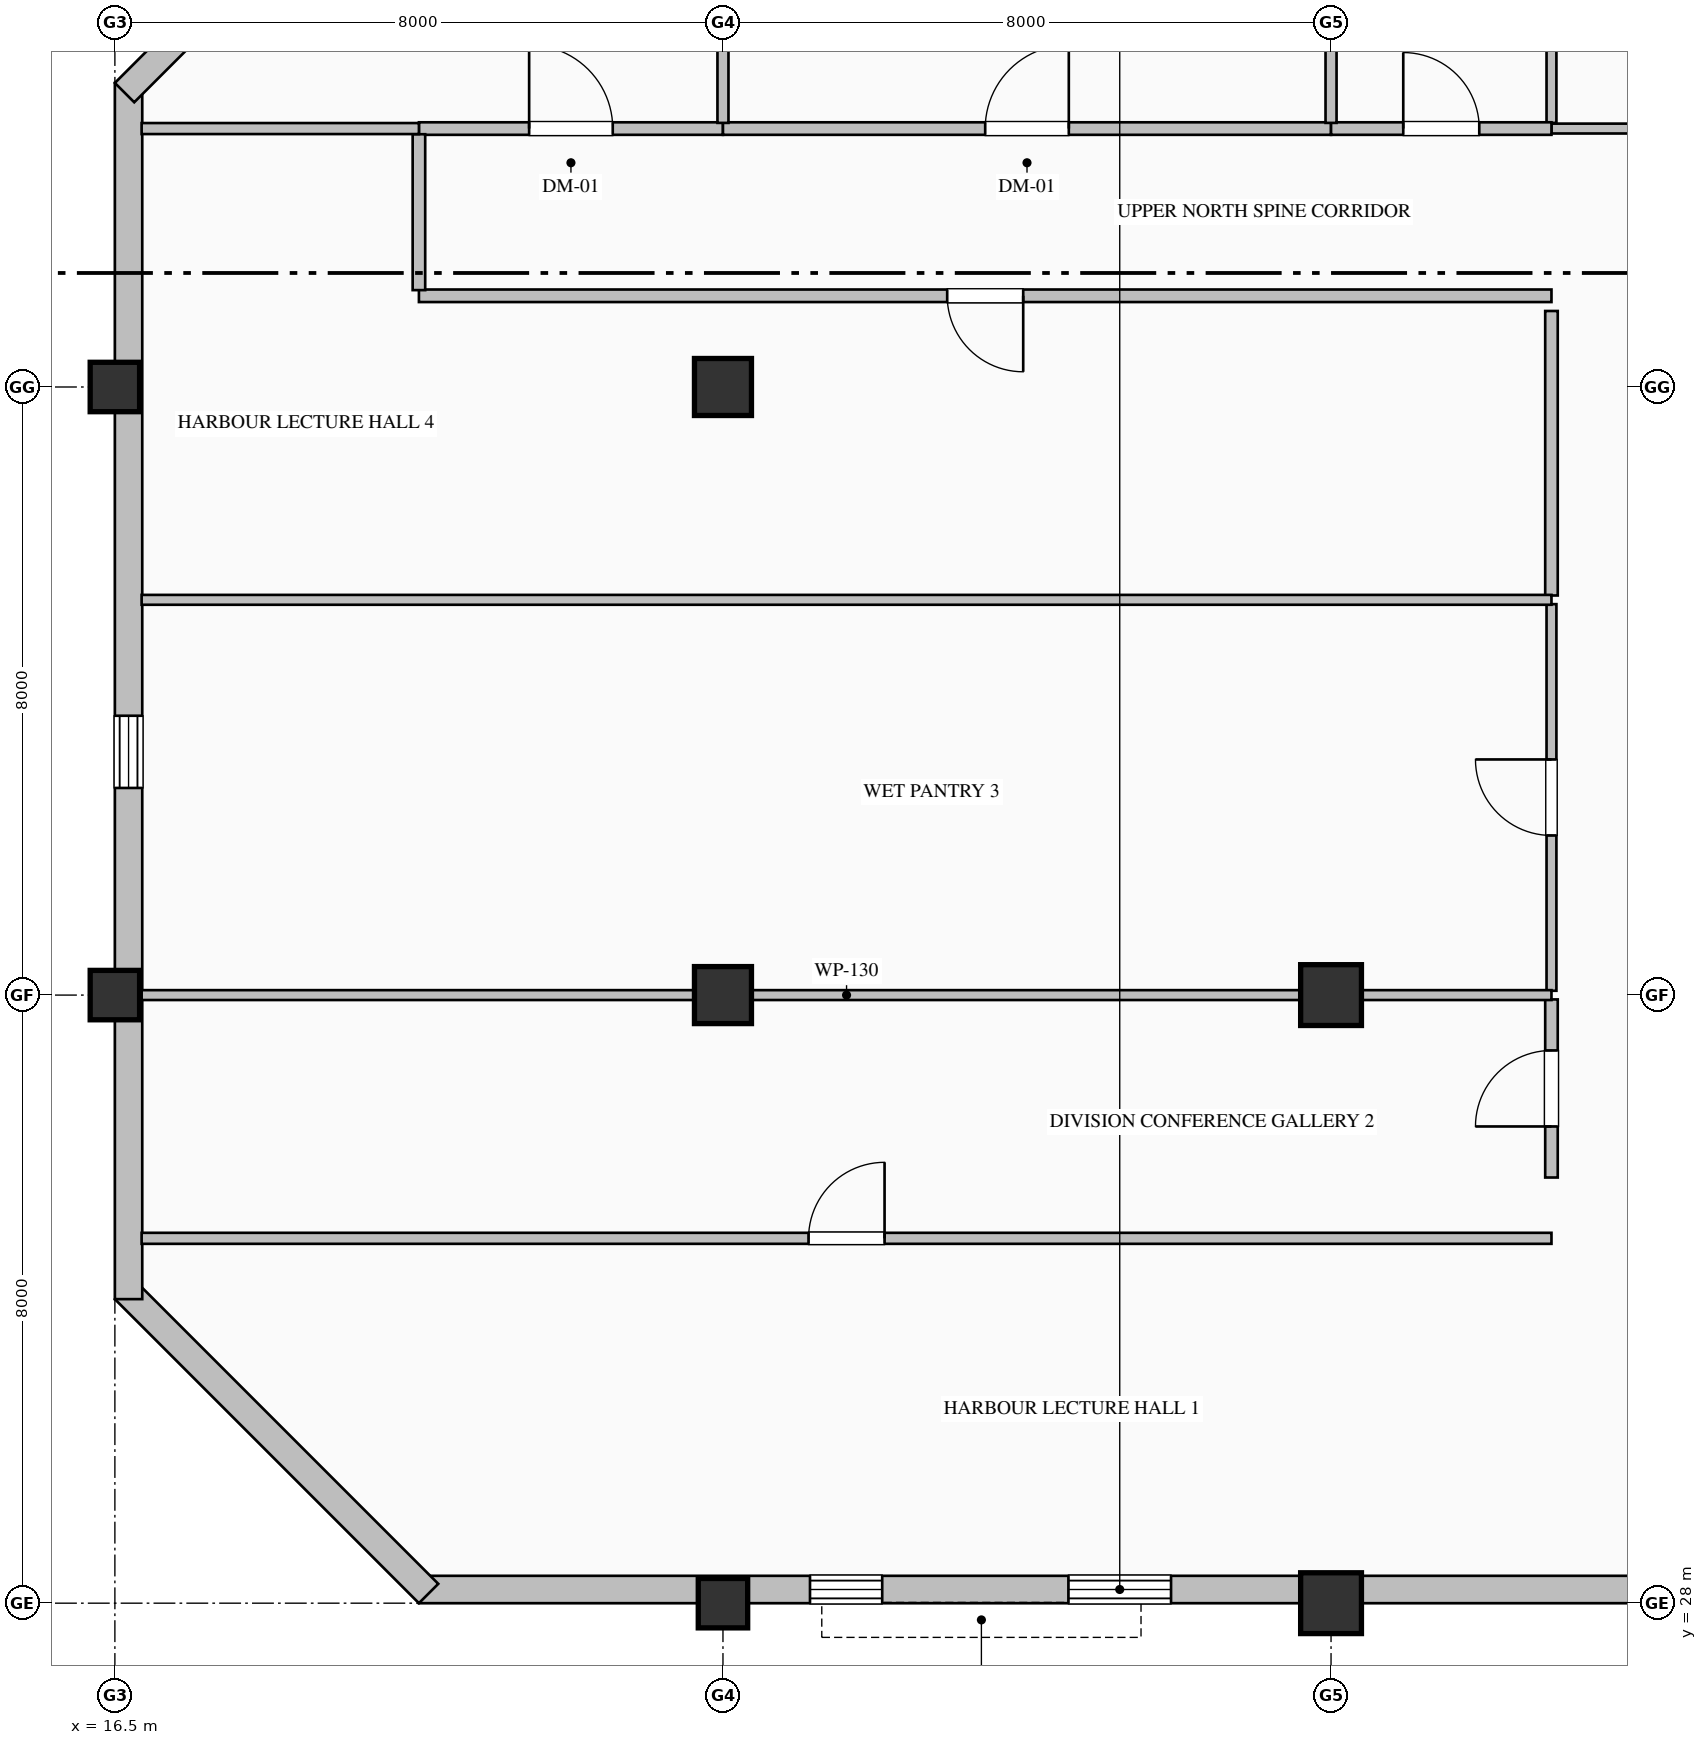
"""IFC4 building model, lengths in metres.
Left out: names, types, materials, properties, quantities, classifications, styles, units other than length and angle.
Written with IfcOpenShell. Run it as: python <this file> out.ifc"""

import sys

from ifc_helpers import new_model, si_unit, direction, frame, frame_2d, origin, origin_2d, place, context, subcontext, project, spatial, rectangle, hollow_rectangle, extrude, element, fill, save


model = new_model("IFC4")
c1 = context("Model", 3, precision=1e-05, world=origin(), true_north=direction((0.0, 1.0)))
c2 = subcontext(c1, "Body", "Model", "MODEL_VIEW")
j1 = project(units=[si_unit("LENGTHUNIT", "METRE"), si_unit("PLANEANGLEUNIT", "RADIAN")], contexts=[c1])
p1 = place(None, origin())
s1 = spatial("IfcSite", under=j1, at=p1, CompositionType="ELEMENT")
p2 = place(p1, origin())
s2 = spatial("IfcBuilding", under=s1, at=p2, CompositionType="ELEMENT")
p3 = place(p2, frame((0.0, 0.0, 307.2)))
s3 = spatial("IfcBuildingStorey", under=s2, at=p3, CompositionType="ELEMENT", Elevation=307.2)
for number, where, z_axis, x_axis in (
    (1, (16.5, 36.0, 0.0), (0.0, 0.0, 1.0), (1.0, 0.0, 0.0)),
    (2, (16.5, 44.0, 0.0), (0.0, 0.0, 1.0), (1.0, 0.0, 0.0)),
    (3, (24.5, 28.0, 0.0), (0.0, 0.0, 1.0), (1.0, 0.0, 0.0)),
):
    element("IfcColumn", number, at=place(p3, frame(where, z_axis=z_axis, x_axis=x_axis)), inside=s3, PredefinedType="COLUMN", context=c2, shape_type="SweptSolid", body=[
        extrude(hollow_rectangle(XDim=0.65, YDim=0.65, WallThickness=0.028, at=origin_2d()), origin(), (0.0, 0.0, 1.0), 4.0),
    ])
for number, where, z_axis, x_axis in (
    (4, (24.5, 36.0, 0.0), (0.0, 0.0, 1.0), (1.0, 0.0, 0.0)),
    (5, (24.5, 44.0, 0.0), (0.0, 0.0, 1.0), (1.0, 0.0, 0.0)),
):
    element("IfcColumn", number, at=place(p3, frame(where, z_axis=z_axis, x_axis=x_axis)), inside=s3, PredefinedType="COLUMN", context=c2, shape_type="SweptSolid", body=[
        extrude(rectangle(XDim=0.75, YDim=0.75, at=origin_2d()), origin(), (0.0, 0.0, 1.0), 4.0),
    ])
for number, where, z_axis, x_axis in (
    (6, (32.5, 28.0, 0.0), (0.0, 0.0, 1.0), (1.0, 0.0, 0.0)),
    (7, (32.5, 36.0, 0.0), (0.0, 0.0, 1.0), (1.0, 0.0, 0.0)),
):
    element("IfcColumn", number, at=place(p3, frame(where, z_axis=z_axis, x_axis=x_axis)), inside=s3, PredefinedType="COLUMN", context=c2, shape_type="SweptSolid", body=[
        extrude(hollow_rectangle(XDim=0.8, YDim=0.8, WallThickness=0.032, at=origin_2d()), origin(), (0.0, 0.0, 1.0), 4.0),
    ])
p4 = place(p3, frame((40.52, 28.18, 0.0), z_axis=(0.0, 0.0, 1.0), x_axis=(-1.0, 0.0, 0.0)))
e8 = element("IfcWall", 8, at=p4, inside=s3, PredefinedType="SOLIDWALL", context=c2, shape_type="SweptSolid", body=[
    extrude(rectangle(XDim=20.02, YDim=0.36, at=frame_2d((10.01, 0.0))), origin(), (0.0, 0.0, 1.0), 3.185),
])
p5 = place(p4, frame((3.125, 0.0, 0.9)))
e9 = element("IfcOpeningElement", 9, at=p5, cuts=e8, PredefinedType="OPENING", context=c2, shape_type="SweptSolid", body=[
    extrude(rectangle(XDim=0.95, YDim=1.85, at=frame_2d((0.475, 0.925))), frame((0.0, 0.19, 0.0), z_axis=(0.0, -1.0, 0.0), x_axis=(1.0, 0.0, 0.0)), (0.0, 0.0, 1.0), 0.38),
])
p6 = place(p4, frame((10.125, 0.0, 0.9)))
e10 = element("IfcOpeningElement", 10, at=p6, cuts=e8, PredefinedType="OPENING", context=c2, shape_type="SweptSolid", body=[
    extrude(rectangle(XDim=1.35, YDim=1.85, at=frame_2d((0.675, 0.925))), frame((0.0, 0.19, 0.0), z_axis=(0.0, -1.0, 0.0), x_axis=(1.0, 0.0, 0.0)), (0.0, 0.0, 1.0), 0.38),
])
p7 = place(p4, frame((13.925, 0.0, 0.9)))
e11 = element("IfcOpeningElement", 11, at=p7, cuts=e8, PredefinedType="OPENING", context=c2, shape_type="SweptSolid", body=[
    extrude(rectangle(XDim=0.95, YDim=1.85, at=frame_2d((0.475, 0.925))), frame((0.0, 0.19, 0.0), z_axis=(0.0, -1.0, 0.0), x_axis=(1.0, 0.0, 0.0)), (0.0, 0.0, 1.0), 0.38),
])
p8 = place(p3, frame((20.627, 28.127, 0.0), z_axis=(0.0, 0.0, 1.0), x_axis=(-0.707106781187, 0.707106781187, 0.0)))
e12 = element("IfcWall", 12, at=p8, inside=s3, PredefinedType="SOLIDWALL", context=c2, shape_type="SweptSolid", body=[
    extrude(rectangle(XDim=5.657, YDim=0.36, at=frame_2d((2.828, 0.0))), origin(), (0.0, 0.0, 1.0), 3.785),
])
p9 = place(p3, frame((16.68, 32.0, 0.0), z_axis=(0.0, 0.0, 1.0), x_axis=(0.0, 1.0, 0.0)))
e13 = element("IfcWall", 13, at=p9, inside=s3, PredefinedType="SOLIDWALL", context=c2, shape_type="SweptSolid", body=[
    extrude(rectangle(XDim=16.0, YDim=0.36, at=frame_2d((8.0, 0.0))), origin(), (0.0, 0.0, 1.0), 3.335),
])
p10 = place(p9, frame((6.725, 0.0, 0.9)))
e14 = element("IfcOpeningElement", 14, at=p10, cuts=e13, PredefinedType="OPENING", context=c2, shape_type="SweptSolid", body=[
    extrude(rectangle(XDim=0.95, YDim=1.85, at=frame_2d((0.475, 0.925))), frame((0.0, 0.19, 0.0), z_axis=(0.0, -1.0, 0.0), x_axis=(1.0, 0.0, 0.0)), (0.0, 0.0, 1.0), 0.38),
])
p11 = place(p3, frame((16.627, 47.873, 0.0), z_axis=(0.0, 0.0, 1.0), x_axis=(0.707106781187, 0.707106781187, 0.0)))
e15 = element("IfcWall", 15, at=p11, inside=s3, PredefinedType="SOLIDWALL", context=c2, shape_type="SweptSolid", body=[
    extrude(rectangle(XDim=5.657, YDim=0.36, at=frame_2d((2.828, 0.0))), origin(), (0.0, 0.0, 1.0), 3.785),
])
p12 = place(p3, frame((37.8, 47.4, 0.0), z_axis=(0.0, 0.0, 1.0), x_axis=(-1.0, 0.0, 0.0)))
e16 = element("IfcWall", 16, at=p12, inside=s3, PredefinedType="PARTITIONING", context=c2, shape_type="SweptSolid", body=[
    extrude(rectangle(XDim=2.4, YDim=0.13, at=frame_2d((1.2, 0.0))), origin(), (0.0, 0.0, 1.0), 3.785),
])
p13 = place(p3, frame((35.4, 47.475, 0.0), z_axis=(0.0, 0.0, 1.0), x_axis=(0.0, 1.0, 0.0)))
e17 = element("IfcWall", 17, at=p13, inside=s3, PredefinedType="PARTITIONING", context=c2, shape_type="SweptSolid", body=[
    extrude(rectangle(XDim=4.173, YDim=0.13, at=frame_2d((2.087, 0.0))), origin(), (0.0, 0.0, 1.0), 3.785),
])
p14 = place(p3, frame((20.5, 47.4, 0.0), z_axis=(0.0, 0.0, 1.0), x_axis=(1.0, 0.0, 0.0)))
e18 = element("IfcWall", 18, at=p14, inside=s3, PredefinedType="PARTITIONING", context=c2, shape_type="SweptSolid", body=[
    extrude(rectangle(XDim=4.0, YDim=0.165, at=frame_2d((2.0, 0.0))), origin(), (0.0, 0.0, 1.0), 3.785),
])
p15 = place(p14, frame((1.45, 0.0, 0.0)))
e19 = element("IfcOpeningElement", 19, at=p15, cuts=e18, PredefinedType="OPENING", context=c2, shape_type="SweptSolid", body=[
    extrude(rectangle(XDim=1.1, YDim=2.2, at=frame_2d((0.55, 1.1))), frame((0.0, 0.093, 0.0), z_axis=(0.0, -1.0, 0.0), x_axis=(1.0, 0.0, 0.0)), (0.0, 0.0, 1.0), 0.185),
])
p16 = place(p3, frame((24.5, 47.4, 0.0), z_axis=(0.0, 0.0, 1.0), x_axis=(1.0, 0.0, 0.0)))
e20 = element("IfcWall", 20, at=p16, inside=s3, PredefinedType="PARTITIONING", context=c2, shape_type="SweptSolid", body=[
    extrude(rectangle(XDim=8.0, YDim=0.165, at=frame_2d((4.0, 0.0))), origin(), (0.0, 0.0, 1.0), 3.785),
])
p17 = place(p16, frame((3.45, 0.0, 0.0)))
e21 = element("IfcOpeningElement", 21, at=p17, cuts=e20, PredefinedType="OPENING", context=c2, shape_type="SweptSolid", body=[
    extrude(rectangle(XDim=1.1, YDim=2.2, at=frame_2d((0.55, 1.1))), frame((0.0, 0.093, 0.0), z_axis=(0.0, -1.0, 0.0), x_axis=(1.0, 0.0, 0.0)), (0.0, 0.0, 1.0), 0.185),
])
p18 = place(p3, frame((32.5, 47.4, 0.0), z_axis=(0.0, 0.0, 1.0), x_axis=(1.0, 0.0, 0.0)))
e22 = element("IfcWall", 22, at=p18, inside=s3, PredefinedType="PARTITIONING", context=c2, shape_type="SweptSolid", body=[
    extrude(rectangle(XDim=2.9, YDim=0.165, at=frame_2d((1.45, 0.0))), origin(), (0.0, 0.0, 1.0), 3.785),
])
p19 = place(p18, frame((0.95, 0.0, 0.0)))
e23 = element("IfcOpeningElement", 23, at=p19, cuts=e22, PredefinedType="OPENING", context=c2, shape_type="SweptSolid", body=[
    extrude(rectangle(XDim=1.0, YDim=2.15, at=frame_2d((0.5, 1.075))), frame((0.0, 0.093, 0.0), z_axis=(0.0, -1.0, 0.0), x_axis=(1.0, 0.0, 0.0)), (0.0, 0.0, 1.0), 0.185),
])
p20 = place(p3, frame((35.4, 45.2, 0.0), z_axis=(0.0, 0.0, 1.0), x_axis=(-1.0, 0.0, 0.0)))
e24 = element("IfcWall", 24, at=p20, inside=s3, PredefinedType="PARTITIONING", context=c2, shape_type="SweptSolid", body=[
    extrude(rectangle(XDim=14.9, YDim=0.165, at=frame_2d((7.45, 0.0))), origin(), (0.0, 0.0, 1.0), 3.785),
])
p21 = place(p20, frame((6.95, 0.0, 0.0)))
e25 = element("IfcOpeningElement", 25, at=p21, cuts=e24, PredefinedType="OPENING", context=c2, shape_type="SweptSolid", body=[
    extrude(rectangle(XDim=1.0, YDim=2.15, at=frame_2d((0.5, 1.075))), frame((0.0, 0.093, 0.0), z_axis=(0.0, -1.0, 0.0), x_axis=(1.0, 0.0, 0.0)), (0.0, 0.0, 1.0), 0.185),
])
p22 = place(p3, frame((20.5, 45.274, 0.0), z_axis=(0.0, 0.0, 1.0), x_axis=(0.0, 1.0, 0.0)))
e26 = element("IfcWall", 26, at=p22, inside=s3, PredefinedType="PARTITIONING", context=c2, shape_type="SweptSolid", body=[
    extrude(rectangle(XDim=2.051, YDim=0.165, at=frame_2d((1.025, 0.0))), origin(), (0.0, 0.0, 1.0), 3.785),
])
p23 = place(p3, frame((35.4, 33.6, 0.0), z_axis=(0.0, 0.0, 1.0), x_axis=(0.0, 1.0, 0.0)))
e27 = element("IfcWall", 27, at=p23, inside=s3, PredefinedType="PARTITIONING", context=c2, shape_type="SweptSolid", body=[
    extrude(rectangle(XDim=2.343, YDim=0.165, at=frame_2d((1.171, 0.0))), origin(), (0.0, 0.0, 1.0), 3.785),
])
p24 = place(p23, frame((0.671, 0.0, 0.0)))
e28 = element("IfcOpeningElement", 28, at=p24, cuts=e27, PredefinedType="OPENING", context=c2, shape_type="SweptSolid", body=[
    extrude(rectangle(XDim=1.0, YDim=2.15, at=frame_2d((0.5, 1.075))), frame((0.0, 0.093, 0.0), z_axis=(0.0, -1.0, 0.0), x_axis=(1.0, 0.0, 0.0)), (0.0, 0.0, 1.0), 0.185),
])
p25 = place(p3, frame((35.4, 36.057, 0.0), z_axis=(0.0, 0.0, 1.0), x_axis=(0.0, 1.0, 0.0)))
e29 = element("IfcWall", 29, at=p25, inside=s3, PredefinedType="PARTITIONING", context=c2, shape_type="SweptSolid", body=[
    extrude(rectangle(XDim=5.086, YDim=0.13, at=frame_2d((2.543, 0.0))), origin(), (0.0, 0.0, 1.0), 3.785),
])
p26 = place(p25, frame((2.043, 0.0, 0.0)))
e30 = element("IfcOpeningElement", 30, at=p26, cuts=e29, PredefinedType="OPENING", context=c2, shape_type="SweptSolid", body=[
    extrude(rectangle(XDim=1.0, YDim=2.15, at=frame_2d((0.5, 1.075))), frame((0.0, 0.075, 0.0), z_axis=(0.0, -1.0, 0.0), x_axis=(1.0, 0.0, 0.0)), (0.0, 0.0, 1.0), 0.15),
])
p27 = place(p3, frame((35.4, 41.257, 0.0), z_axis=(0.0, 0.0, 1.0), x_axis=(0.0, 1.0, 0.0)))
e31 = element("IfcWall", 31, at=p27, inside=s3, PredefinedType="PARTITIONING", context=c2, shape_type="SweptSolid", body=[
    extrude(rectangle(XDim=3.743, YDim=0.165, at=frame_2d((1.872, 0.0))), origin(), (0.0, 0.0, 1.0), 3.785),
])
p28 = place(p3, frame((24.5, 51.648, 0.0), z_axis=(0.0, 0.0, 1.0), x_axis=(0.0, -1.0, 0.0)))
e32 = element("IfcWall", 32, at=p28, inside=s3, PredefinedType="PARTITIONING", context=c2, shape_type="SweptSolid", body=[
    extrude(rectangle(XDim=4.173, YDim=0.145, at=frame_2d((2.087, 0.0))), origin(), (0.0, 0.0, 1.0), 3.177),
])
p29 = place(p3, frame((20.5, 47.4, 0.0), z_axis=(0.0, 0.0, 1.0), x_axis=(-1.0, 0.0, 0.0)))
e33 = element("IfcWall", 33, at=p29, inside=s3, PredefinedType="PARTITIONING", context=c2, shape_type="SweptSolid", body=[
    extrude(rectangle(XDim=3.648, YDim=0.145, at=frame_2d((1.824, 0.0))), origin(), (0.0, 0.0, 1.0), 3.785),
])
p30 = place(p3, frame((32.5, 51.648, 0.0), z_axis=(0.0, 0.0, 1.0), x_axis=(0.0, -1.0, 0.0)))
e34 = element("IfcWall", 34, at=p30, inside=s3, PredefinedType="PARTITIONING", context=c2, shape_type="SweptSolid", body=[
    extrude(rectangle(XDim=4.173, YDim=0.145, at=frame_2d((2.087, 0.0))), origin(), (0.0, 0.0, 1.0), 3.785),
])
p31 = place(p3, frame((16.852, 32.8, 0.0), z_axis=(0.0, 0.0, 1.0), x_axis=(1.0, 0.0, 0.0)))
e35 = element("IfcWall", 35, at=p31, inside=s3, PredefinedType="PARTITIONING", context=c2, shape_type="SweptSolid", body=[
    extrude(rectangle(XDim=18.548, YDim=0.145, at=frame_2d((9.274, 0.0))), origin(), (0.0, 0.0, 1.0), 3.785),
])
p32 = place(p31, frame((8.774, 0.0, 0.0)))
e36 = element("IfcOpeningElement", 36, at=p32, cuts=e35, PredefinedType="OPENING", context=c2, shape_type="SweptSolid", body=[
    extrude(rectangle(XDim=1.0, YDim=2.15, at=frame_2d((0.5, 1.075))), frame((0.0, 0.083, 0.0), z_axis=(0.0, -1.0, 0.0), x_axis=(1.0, 0.0, 0.0)), (0.0, 0.0, 1.0), 0.165),
])
p33 = place(p3, frame((16.852, 36.0, 0.0), z_axis=(0.0, 0.0, 1.0), x_axis=(1.0, 0.0, 0.0)))
e37 = element("IfcWall", 37, at=p33, inside=s3, PredefinedType="PARTITIONING", context=c2, shape_type="SweptSolid", body=[
    extrude(rectangle(XDim=18.548, YDim=0.13, at=frame_2d((9.274, 0.0))), origin(), (0.0, 0.0, 1.0), 3.177),
])
p34 = place(p3, frame((16.852, 41.2, 0.0), z_axis=(0.0, 0.0, 1.0), x_axis=(1.0, 0.0, 0.0)))
e38 = element("IfcWall", 38, at=p34, inside=s3, PredefinedType="PARTITIONING", context=c2, shape_type="SweptSolid", body=[
    extrude(rectangle(XDim=18.548, YDim=0.13, at=frame_2d((9.274, 0.0))), origin(), (0.0, 0.0, 1.0), 3.785),
])
p35 = place(p6, origin())
e39 = element("IfcWindow", 39, at=p35, inside=s3, PartitioningType="DOUBLE_PANEL_VERTICAL", PredefinedType="WINDOW", context=c2, shape_type="SweptSolid", body=[
    extrude(rectangle(XDim=1.35, YDim=1.85, at=frame_2d((0.675, 0.925))), frame((0.0, 0.15, 0.0), z_axis=(0.0, -1.0, 0.0), x_axis=(1.0, 0.0, 0.0)), (0.0, 0.0, 1.0), 0.06),
])
fill(e10, e39)
p36 = place(p7, origin())
e40 = element("IfcWindow", 40, at=p36, inside=s3, PartitioningType="SINGLE_PANEL", PredefinedType="WINDOW", context=c2, shape_type="SweptSolid", body=[
    extrude(rectangle(XDim=0.95, YDim=1.85, at=frame_2d((0.475, 0.925))), frame((0.0, 0.15, 0.0), z_axis=(0.0, -1.0, 0.0), x_axis=(1.0, 0.0, 0.0)), (0.0, 0.0, 1.0), 0.06),
])
fill(e11, e40)
p37 = place(p10, origin())
e41 = element("IfcWindow", 41, at=p37, inside=s3, PartitioningType="SINGLE_PANEL", PredefinedType="WINDOW", context=c2, shape_type="SweptSolid", body=[
    extrude(rectangle(XDim=0.95, YDim=1.85, at=frame_2d((0.475, 0.925))), frame((0.0, 0.15, 0.0), z_axis=(0.0, -1.0, 0.0), x_axis=(1.0, 0.0, 0.0)), (0.0, 0.0, 1.0), 0.06),
])
fill(e14, e41)
p38 = place(p15, origin())
e42 = element("IfcDoor", 42, at=p38, inside=s3, OperationType="SINGLE_SWING_LEFT", PredefinedType="DOOR", context=c2, shape_type="SweptSolid", body=[
    extrude(rectangle(XDim=1.1, YDim=2.2, at=frame_2d((0.55, 1.1))), frame((0.0, 0.025, 0.0), z_axis=(0.0, -1.0, 0.0), x_axis=(1.0, 0.0, 0.0)), (0.0, 0.0, 1.0), 0.05),
])
fill(e19, e42)
p39 = place(p17, origin())
e43 = element("IfcDoor", 43, at=p39, inside=s3, OperationType="SINGLE_SWING_RIGHT", PredefinedType="DOOR", context=c2, shape_type="SweptSolid", body=[
    extrude(rectangle(XDim=1.1, YDim=2.2, at=frame_2d((0.55, 1.1))), frame((0.0, 0.025, 0.0), z_axis=(0.0, -1.0, 0.0), x_axis=(1.0, 0.0, 0.0)), (0.0, 0.0, 1.0), 0.05),
])
fill(e21, e43)
p40 = place(p19, origin())
e44 = element("IfcDoor", 44, at=p40, inside=s3, OperationType="SINGLE_SWING_LEFT", PredefinedType="DOOR", context=c2, shape_type="SweptSolid", body=[
    extrude(rectangle(XDim=1.0, YDim=2.15, at=frame_2d((0.5, 1.075))), frame((0.0, 0.025, 0.0), z_axis=(0.0, -1.0, 0.0), x_axis=(1.0, 0.0, 0.0)), (0.0, 0.0, 1.0), 0.05),
])
fill(e23, e44)
p41 = place(p32, origin())
e45 = element("IfcDoor", 45, at=p41, inside=s3, OperationType="SINGLE_SWING_RIGHT", PredefinedType="DOOR", context=c2, shape_type="SweptSolid", body=[
    extrude(rectangle(XDim=1.0, YDim=2.15, at=frame_2d((0.5, 1.075))), frame((0.0, 0.025, 0.0), z_axis=(0.0, -1.0, 0.0), x_axis=(1.0, 0.0, 0.0)), (0.0, 0.0, 1.0), 0.05),
])
fill(e36, e45)
p42 = place(p24, origin())
e46 = element("IfcDoor", 46, at=p42, inside=s3, OperationType="SINGLE_SWING_LEFT", PredefinedType="DOOR", context=c2, shape_type="SweptSolid", body=[
    extrude(rectangle(XDim=1.0, YDim=2.15, at=frame_2d((0.5, 1.075))), frame((0.0, 0.025, 0.0), z_axis=(0.0, -1.0, 0.0), x_axis=(1.0, 0.0, 0.0)), (0.0, 0.0, 1.0), 0.05),
])
fill(e28, e46)
p43 = place(p26, origin())
e47 = element("IfcDoor", 47, at=p43, inside=s3, OperationType="SINGLE_SWING_RIGHT", PredefinedType="DOOR", context=c2, shape_type="SweptSolid", body=[
    extrude(rectangle(XDim=1.0, YDim=2.15, at=frame_2d((0.5, 1.075))), frame((0.0, 0.025, 0.0), z_axis=(0.0, -1.0, 0.0), x_axis=(1.0, 0.0, 0.0)), (0.0, 0.0, 1.0), 0.05),
])
fill(e30, e47)
p44 = place(p21, origin())
e48 = element("IfcDoor", 48, at=p44, inside=s3, OperationType="SINGLE_SWING_LEFT", PredefinedType="DOOR", context=c2, shape_type="SweptSolid", body=[
    extrude(rectangle(XDim=1.0, YDim=2.15, at=frame_2d((0.5, 1.075))), frame((0.0, 0.025, 0.0), z_axis=(0.0, -1.0, 0.0), x_axis=(1.0, 0.0, 0.0)), (0.0, 0.0, 1.0), 0.05),
])
fill(e25, e48)
save(model, sys.argv[1])
